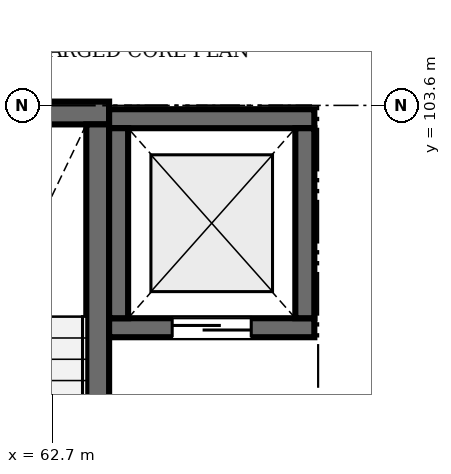
"""IFC4 building model, lengths in metres.
Left out: names, types, materials, properties, quantities, classifications, styles, units other than length and angle.
Written with IfcOpenShell. Run it as: python <this file> out.ifc"""

import sys

from ifc_helpers import new_model, si_unit, direction, frame, frame_2d, origin, place, context, subcontext, project, spatial, rectangle, extrude, element, fill, save


model = new_model("IFC4")
c1 = context("Model", 3, precision=1e-05, world=origin(), true_north=direction((0.0, 1.0)))
c2 = subcontext(c1, "Body", "Model", "MODEL_VIEW")
j1 = project(units=[si_unit("LENGTHUNIT", "METRE"), si_unit("PLANEANGLEUNIT", "RADIAN")], contexts=[c1])
p1 = place(None, origin())
s1 = spatial("IfcSite", under=j1, at=p1, CompositionType="ELEMENT")
p2 = place(p1, origin())
s2 = spatial("IfcBuilding", under=s1, at=p2, CompositionType="ELEMENT")
p3 = place(p2, frame((0.0, 0.0, 5.4)))
s3 = spatial("IfcBuildingStorey", under=s2, at=p3, CompositionType="ELEMENT", Elevation=5.4)
p4 = place(p3, frame((59.75, 103.5, 0.0), z_axis=(0.0, 0.0, 1.0), x_axis=(1.0, 0.0, 0.0)))
e1 = element("IfcWall", 1, at=p4, inside=s3, PredefinedType="SHEAR", context=c2, shape_type="SweptSolid", body=[
    extrude(rectangle(XDim=3.7, YDim=0.3, at=frame_2d((1.85, 0.0))), origin(), (0.0, 0.0, 1.0), 4.58),
])
p5 = place(p3, frame((63.3, 95.45, 0.0), z_axis=(0.0, 0.0, 1.0), x_axis=(0.0, 1.0, 0.0)))
e2 = element("IfcWall", 2, at=p5, inside=s3, PredefinedType="SHEAR", context=c2, shape_type="SweptSolid", body=[
    extrude(rectangle(XDim=7.9, YDim=0.3, at=frame_2d((3.95, 0.0))), origin(), (0.0, 0.0, 1.0), 4.58),
])
p6 = place(p3, frame((63.45, 100.675, 0.0), z_axis=(0.0, 0.0, 1.0), x_axis=(1.0, 0.0, 0.0)))
e3 = element("IfcWall", 3, at=p6, inside=s3, PredefinedType="SHEAR", context=c2, shape_type="SweptSolid", body=[
    extrude(rectangle(XDim=2.7, YDim=0.25, at=frame_2d((1.35, 0.0))), origin(), (0.0, 0.0, 1.0), 4.58),
])
p7 = place(p6, frame((0.83, 0.0, 0.0)))
e4 = element("IfcOpeningElement", 4, at=p7, cuts=e3, PredefinedType="OPENING", context=c2, shape_type="SweptSolid", body=[
    extrude(rectangle(XDim=1.04, YDim=2.15, at=frame_2d((0.52, 1.075))), frame((0.0, 0.135, 0.0), z_axis=(0.0, -1.0, 0.0), x_axis=(1.0, 0.0, 0.0)), (0.0, 0.0, 1.0), 0.27),
])
p8 = place(p3, frame((63.45, 103.425, 0.0), z_axis=(0.0, 0.0, 1.0), x_axis=(1.0, 0.0, 0.0)))
e5 = element("IfcWall", 5, at=p8, inside=s3, PredefinedType="SHEAR", context=c2, shape_type="SweptSolid", body=[
    extrude(rectangle(XDim=2.7, YDim=0.25, at=frame_2d((1.35, 0.0))), origin(), (0.0, 0.0, 1.0), 4.58),
])
for number, where, z_axis, x_axis in (
    (6, (63.575, 100.8, 0.0), (0.0, 0.0, 1.0), (0.0, 1.0, 0.0)),
    (7, (66.025, 100.8, 0.0), (0.0, 0.0, 1.0), (0.0, 1.0, 0.0)),
):
    element("IfcWall", number, at=place(p3, frame(where, z_axis=z_axis, x_axis=x_axis)), inside=s3, PredefinedType="SHEAR", context=c2, shape_type="SweptSolid", body=[
        extrude(rectangle(XDim=2.5, YDim=0.25, at=frame_2d((1.25, 0.0))), origin(), (0.0, 0.0, 1.0), 4.58),
    ])
p9 = place(p7, origin())
e8 = element("IfcDoor", 8, at=p9, inside=s3, OperationType="SLIDING_TO_LEFT", PredefinedType="DOOR", context=c2, shape_type="SweptSolid", body=[
    extrude(rectangle(XDim=1.04, YDim=2.15, at=frame_2d((0.52, 1.075))), frame((0.0, 0.025, 0.0), z_axis=(0.0, -1.0, 0.0), x_axis=(1.0, 0.0, 0.0)), (0.0, 0.0, 1.0), 0.05),
])
fill(e4, e8)
save(model, sys.argv[1])
